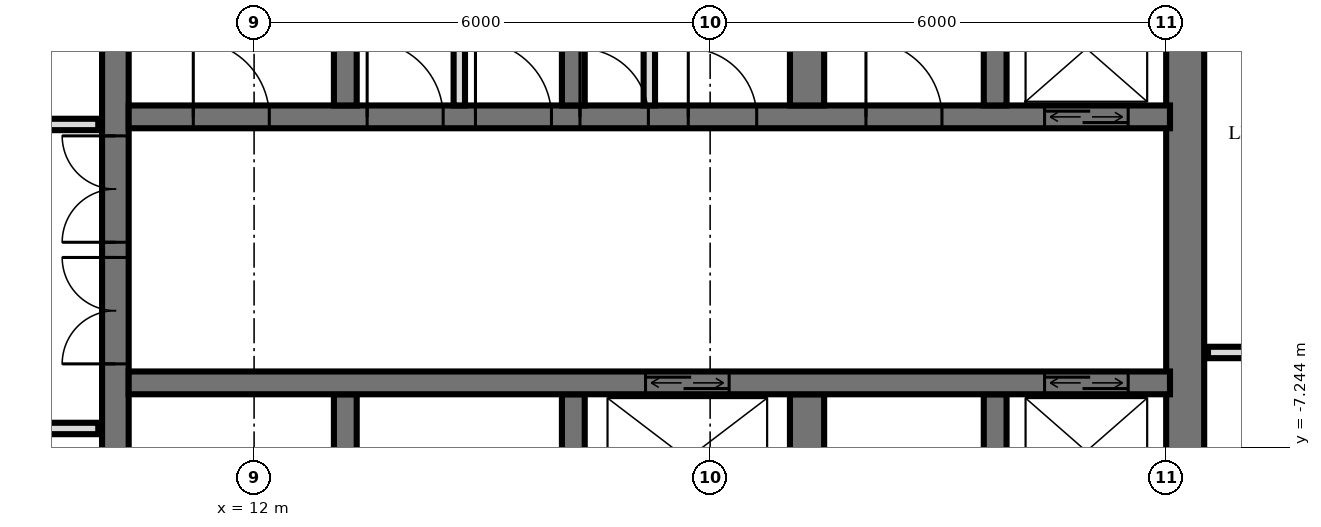
"""IFC4 building model, lengths in metres.
Left out: names, types, materials, properties, quantities, classifications, styles, units other than length and angle.
Written with IfcOpenShell. Run it as: python <this file> out.ifc"""

import sys

from ifc_helpers import new_model, si_unit, direction, frame, frame_2d, origin, place, context, subcontext, project, spatial, rectangle, extrude, element, fill, save


model = new_model("IFC4")
c1 = context("Model", 3, precision=1e-05, world=origin(), true_north=direction((0.0, 1.0)))
c2 = subcontext(c1, "Body", "Model", "MODEL_VIEW")
j1 = project(units=[si_unit("LENGTHUNIT", "METRE"), si_unit("PLANEANGLEUNIT", "RADIAN")], contexts=[c1])
p1 = place(None, origin())
s1 = spatial("IfcSite", under=j1, at=p1, CompositionType="ELEMENT")
p2 = place(p1, origin())
s2 = spatial("IfcBuilding", under=s1, at=p2, CompositionType="ELEMENT")
p3 = place(p2, frame((0.0, 0.0, 208.1)))
s3 = spatial("IfcBuildingStorey", under=s2, at=p3, CompositionType="ELEMENT", Elevation=208.1)
p4 = place(p3, frame((10.175, -14.55, 0.0), z_axis=(0.0, 0.0, 1.0), x_axis=(0.0, 1.0, 0.0)))
e1 = element("IfcWall", 1, at=p4, inside=s3, PredefinedType="SHEAR", context=c2, shape_type="SweptSolid", body=[
    extrude(rectangle(XDim=14.1, YDim=0.35, at=frame_2d((7.05, 0.0))), origin(), (0.0, 0.0, 1.0), 3.5),
])
p5 = place(p4, frame((8.4, 0.0, 0.0)))
e2 = element("IfcOpeningElement", 2, at=p5, cuts=e1, PredefinedType="OPENING", context=c2, shape_type="SweptSolid", body=[
    extrude(rectangle(XDim=1.4, YDim=2.4, at=frame_2d((0.7, 1.2))), frame((0.0, 0.185, 0.0), z_axis=(0.0, -1.0, 0.0), x_axis=(1.0, 0.0, 0.0)), (0.0, 0.0, 1.0), 0.37),
])
p6 = place(p4, frame((10.0, 0.0, 0.0)))
e3 = element("IfcOpeningElement", 3, at=p6, cuts=e1, PredefinedType="OPENING", context=c2, shape_type="SweptSolid", body=[
    extrude(rectangle(XDim=1.4, YDim=2.4, at=frame_2d((0.7, 1.2))), frame((0.0, 0.185, 0.0), z_axis=(0.0, -1.0, 0.0), x_axis=(1.0, 0.0, 0.0)), (0.0, 0.0, 1.0), 0.37),
])
p7 = place(p4, frame((4.0, 0.0, 0.0)))
e4 = element("IfcOpeningElement", 4, at=p7, cuts=e1, PredefinedType="OPENING", context=c2, shape_type="SweptSolid", body=[
    extrude(rectangle(XDim=1.2, YDim=2.1, at=frame_2d((0.6, 1.05))), frame((0.0, 0.185, 0.0), z_axis=(0.0, -1.0, 0.0), x_axis=(1.0, 0.0, 0.0)), (0.0, 0.0, 1.0), 0.37),
])
p8 = place(p3, frame((24.25, -14.55, 0.0), z_axis=(0.0, 0.0, 1.0), x_axis=(0.0, 1.0, 0.0)))
e5 = element("IfcWall", 5, at=p8, inside=s3, PredefinedType="SHEAR", context=c2, shape_type="SweptSolid", body=[
    extrude(rectangle(XDim=14.1, YDim=0.5, at=frame_2d((7.05, 0.0))), origin(), (0.0, 0.0, 1.0), 3.5),
])
p9 = place(p3, frame((10.35, -2.9, 0.0), z_axis=(0.0, 0.0, 1.0), x_axis=(1.0, 0.0, 0.0)))
e6 = element("IfcWall", 6, at=p9, inside=s3, PredefinedType="SHEAR", context=c2, shape_type="SweptSolid", body=[
    extrude(rectangle(XDim=13.7, YDim=0.3, at=frame_2d((6.85, 0.0))), origin(), (0.0, 0.0, 1.0), 3.5),
])
p10 = place(p9, frame((12.05, 0.0, 0.0)))
e7 = element("IfcOpeningElement", 7, at=p10, cuts=e6, PredefinedType="OPENING", context=c2, shape_type="SweptSolid", body=[
    extrude(rectangle(XDim=1.1, YDim=2.1, at=frame_2d((0.55, 1.05))), frame((0.0, 0.16, 0.0), z_axis=(0.0, -1.0, 0.0), x_axis=(1.0, 0.0, 0.0)), (0.0, 0.0, 1.0), 0.32),
])
p11 = place(p9, frame((5.938, 0.0, 0.0)))
e8 = element("IfcOpeningElement", 8, at=p11, cuts=e6, PredefinedType="OPENING", context=c2, shape_type="SweptSolid", body=[
    extrude(rectangle(XDim=0.9, YDim=2.1, at=frame_2d((0.45, 1.05))), frame((0.0, 0.16, 0.0), z_axis=(0.0, -1.0, 0.0), x_axis=(1.0, 0.0, 0.0)), (0.0, 0.0, 1.0), 0.32),
])
p12 = place(p9, frame((7.363, 0.0, 0.0)))
e9 = element("IfcOpeningElement", 9, at=p12, cuts=e6, PredefinedType="OPENING", context=c2, shape_type="SweptSolid", body=[
    extrude(rectangle(XDim=0.9, YDim=2.1, at=frame_2d((0.45, 1.05))), frame((0.0, 0.16, 0.0), z_axis=(0.0, -1.0, 0.0), x_axis=(1.0, 0.0, 0.0)), (0.0, 0.0, 1.0), 0.32),
])
p13 = place(p9, frame((0.85, 0.0, 0.0)))
e10 = element("IfcOpeningElement", 10, at=p13, cuts=e6, PredefinedType="OPENING", context=c2, shape_type="SweptSolid", body=[
    extrude(rectangle(XDim=1.0, YDim=2.1, at=frame_2d((0.5, 1.05))), frame((0.0, 0.16, 0.0), z_axis=(0.0, -1.0, 0.0), x_axis=(1.0, 0.0, 0.0)), (0.0, 0.0, 1.0), 0.32),
])
p14 = place(p9, frame((3.137, 0.0, 0.0)))
e11 = element("IfcOpeningElement", 11, at=p14, cuts=e6, PredefinedType="OPENING", context=c2, shape_type="SweptSolid", body=[
    extrude(rectangle(XDim=1.0, YDim=2.1, at=frame_2d((0.5, 1.05))), frame((0.0, 0.16, 0.0), z_axis=(0.0, -1.0, 0.0), x_axis=(1.0, 0.0, 0.0)), (0.0, 0.0, 1.0), 0.32),
])
p15 = place(p9, frame((4.562, 0.0, 0.0)))
e12 = element("IfcOpeningElement", 12, at=p15, cuts=e6, PredefinedType="OPENING", context=c2, shape_type="SweptSolid", body=[
    extrude(rectangle(XDim=1.0, YDim=2.1, at=frame_2d((0.5, 1.05))), frame((0.0, 0.16, 0.0), z_axis=(0.0, -1.0, 0.0), x_axis=(1.0, 0.0, 0.0)), (0.0, 0.0, 1.0), 0.32),
])
p16 = place(p9, frame((9.7, 0.0, 0.0)))
e13 = element("IfcOpeningElement", 13, at=p16, cuts=e6, PredefinedType="OPENING", context=c2, shape_type="SweptSolid", body=[
    extrude(rectangle(XDim=1.0, YDim=2.1, at=frame_2d((0.5, 1.05))), frame((0.0, 0.16, 0.0), z_axis=(0.0, -1.0, 0.0), x_axis=(1.0, 0.0, 0.0)), (0.0, 0.0, 1.0), 0.32),
])
p17 = place(p3, frame((10.35, -6.4, 0.0), z_axis=(0.0, 0.0, 1.0), x_axis=(1.0, 0.0, 0.0)))
e14 = element("IfcWall", 14, at=p17, inside=s3, PredefinedType="SHEAR", context=c2, shape_type="SweptSolid", body=[
    extrude(rectangle(XDim=13.7, YDim=0.3, at=frame_2d((6.85, 0.0))), origin(), (0.0, 0.0, 1.0), 3.5),
])
p18 = place(p17, frame((12.05, 0.0, 0.0)))
e15 = element("IfcOpeningElement", 15, at=p18, cuts=e14, PredefinedType="OPENING", context=c2, shape_type="SweptSolid", body=[
    extrude(rectangle(XDim=1.1, YDim=2.1, at=frame_2d((0.55, 1.05))), frame((0.0, 0.16, 0.0), z_axis=(0.0, -1.0, 0.0), x_axis=(1.0, 0.0, 0.0)), (0.0, 0.0, 1.0), 0.32),
])
p19 = place(p17, frame((6.8, 0.0, 0.0)))
e16 = element("IfcOpeningElement", 16, at=p19, cuts=e14, PredefinedType="OPENING", context=c2, shape_type="SweptSolid", body=[
    extrude(rectangle(XDim=1.1, YDim=2.1, at=frame_2d((0.55, 1.05))), frame((0.0, 0.16, 0.0), z_axis=(0.0, -1.0, 0.0), x_axis=(1.0, 0.0, 0.0)), (0.0, 0.0, 1.0), 0.32),
])
for number, where, z_axis, x_axis in (
    (17, (13.2, -2.75, 0.0), (0.0, 0.0, 1.0), (0.0, 1.0, 0.0)),
    (18, (13.2, -8.85, 0.0), (0.0, 0.0, 1.0), (0.0, 1.0, 0.0)),
    (19, (16.2, -2.75, 0.0), (0.0, 0.0, 1.0), (0.0, 1.0, 0.0)),
    (20, (16.2, -8.85, 0.0), (0.0, 0.0, 1.0), (0.0, 1.0, 0.0)),
):
    element("IfcWall", number, at=place(p3, frame(where, z_axis=z_axis, x_axis=x_axis)), inside=s3, PredefinedType="SHEAR", context=c2, shape_type="SweptSolid", body=[
        extrude(rectangle(XDim=2.3, YDim=0.3, at=frame_2d((1.15, 0.0))), origin(), (0.0, 0.0, 1.0), 3.5),
    ])
for number, where, z_axis, x_axis in (
    (21, (19.275, -2.75, 0.0), (0.0, 0.0, 1.0), (0.0, 1.0, 0.0)),
    (22, (19.275, -8.85, 0.0), (0.0, 0.0, 1.0), (0.0, 1.0, 0.0)),
):
    element("IfcWall", number, at=place(p3, frame(where, z_axis=z_axis, x_axis=x_axis)), inside=s3, PredefinedType="SHEAR", context=c2, shape_type="SweptSolid", body=[
        extrude(rectangle(XDim=2.3, YDim=0.45, at=frame_2d((1.15, 0.0))), origin(), (0.0, 0.0, 1.0), 3.5),
    ])
for number, where, z_axis, x_axis in (
    (23, (21.75, -2.75, 0.0), (0.0, 0.0, 1.0), (0.0, 1.0, 0.0)),
    (24, (21.75, -8.85, 0.0), (0.0, 0.0, 1.0), (0.0, 1.0, 0.0)),
):
    element("IfcWall", number, at=place(p3, frame(where, z_axis=z_axis, x_axis=x_axis)), inside=s3, PredefinedType="SHEAR", context=c2, shape_type="SweptSolid", body=[
        extrude(rectangle(XDim=2.3, YDim=0.3, at=frame_2d((1.15, 0.0))), origin(), (0.0, 0.0, 1.0), 3.5),
    ])
for number, where, z_axis, x_axis in (
    (25, (17.2, -2.75, 0.0), (0.0, 0.0, 1.0), (0.0, 1.0, 0.0)),
    (26, (14.7, -2.75, 0.0), (0.0, 0.0, 1.0), (0.0, 1.0, 0.0)),
):
    element("IfcWall", number, at=place(p3, frame(where, z_axis=z_axis, x_axis=x_axis)), inside=s3, PredefinedType="PARTITIONING", context=c2, shape_type="SweptSolid", body=[
        extrude(rectangle(XDim=2.3, YDim=0.15, at=frame_2d((1.15, 0.0))), origin(), (0.0, 0.0, 1.0), 3.2),
    ])
p20 = place(p3, frame((-9.95, -7.0, 0.0), z_axis=(0.0, 0.0, 1.0), x_axis=(1.0, 0.0, 0.0)))
e27 = element("IfcWall", 27, at=p20, inside=s3, PredefinedType="PARTITIONING", context=c2, shape_type="SweptSolid", body=[
    extrude(rectangle(XDim=19.9, YDim=0.15, at=frame_2d((9.95, 0.0))), origin(), (0.0, 0.0, 1.0), 3.22),
])
p21 = place(p20, frame((9.45, 0.0, 0.0)))
e28 = element("IfcOpeningElement", 28, at=p21, cuts=e27, PredefinedType="OPENING", context=c2, shape_type="SweptSolid", body=[
    extrude(rectangle(XDim=1.0, YDim=2.1, at=frame_2d((0.5, 1.05))), frame((0.0, 0.085, 0.0), z_axis=(0.0, -1.0, 0.0), x_axis=(1.0, 0.0, 0.0)), (0.0, 0.0, 1.0), 0.17),
])
p22 = place(p20, frame((3.45, 0.0, 0.0)))
e29 = element("IfcOpeningElement", 29, at=p22, cuts=e27, PredefinedType="OPENING", context=c2, shape_type="SweptSolid", body=[
    extrude(rectangle(XDim=1.0, YDim=2.1, at=frame_2d((0.5, 1.05))), frame((0.0, 0.085, 0.0), z_axis=(0.0, -1.0, 0.0), x_axis=(1.0, 0.0, 0.0)), (0.0, 0.0, 1.0), 0.17),
])
p23 = place(p3, frame((24.55, -6.0, 0.0), z_axis=(0.0, 0.0, 1.0), x_axis=(1.0, 0.0, 0.0)))
e30 = element("IfcWall", 30, at=p23, inside=s3, PredefinedType="PARTITIONING", context=c2, shape_type="SweptSolid", body=[
    extrude(rectangle(XDim=2.27, YDim=0.15, at=frame_2d((1.135, 0.0))), origin(), (0.0, 0.0, 1.0), 3.22),
])
p24 = place(p23, frame((0.75, 0.0, 0.0)))
e31 = element("IfcOpeningElement", 31, at=p24, cuts=e30, PredefinedType="OPENING", context=c2, shape_type="SweptSolid", body=[
    extrude(rectangle(XDim=0.9, YDim=2.1, at=frame_2d((0.45, 1.05))), frame((0.0, 0.085, 0.0), z_axis=(0.0, -1.0, 0.0), x_axis=(1.0, 0.0, 0.0)), (0.0, 0.0, 1.0), 0.17),
])
p25 = place(p3, frame((-9.95, -3.0, 0.0), z_axis=(0.0, 0.0, 1.0), x_axis=(1.0, 0.0, 0.0)))
e32 = element("IfcWall", 32, at=p25, inside=s3, PredefinedType="PARTITIONING", context=c2, shape_type="SweptSolid", body=[
    extrude(rectangle(XDim=19.9, YDim=0.15, at=frame_2d((9.95, 0.0))), origin(), (0.0, 0.0, 1.0), 3.22),
])
p26 = place(p25, frame((4.2, 0.0, 0.0)))
e33 = element("IfcOpeningElement", 33, at=p26, cuts=e32, PredefinedType="OPENING", context=c2, shape_type="SweptSolid", body=[
    extrude(rectangle(XDim=1.0, YDim=2.1, at=frame_2d((0.5, 1.05))), frame((0.0, 0.085, 0.0), z_axis=(0.0, -1.0, 0.0), x_axis=(1.0, 0.0, 0.0)), (0.0, 0.0, 1.0), 0.17),
])
p27 = place(p25, frame((11.45, 0.0, 0.0)))
e34 = element("IfcOpeningElement", 34, at=p27, cuts=e32, PredefinedType="OPENING", context=c2, shape_type="SweptSolid", body=[
    extrude(rectangle(XDim=1.0, YDim=2.1, at=frame_2d((0.5, 1.05))), frame((0.0, 0.085, 0.0), z_axis=(0.0, -1.0, 0.0), x_axis=(1.0, 0.0, 0.0)), (0.0, 0.0, 1.0), 0.17),
])
p28 = place(p25, frame((15.45, 0.0, 0.0)))
e35 = element("IfcOpeningElement", 35, at=p28, cuts=e32, PredefinedType="OPENING", context=c2, shape_type="SweptSolid", body=[
    extrude(rectangle(XDim=1.0, YDim=2.1, at=frame_2d((0.5, 1.05))), frame((0.0, 0.085, 0.0), z_axis=(0.0, -1.0, 0.0), x_axis=(1.0, 0.0, 0.0)), (0.0, 0.0, 1.0), 0.17),
])
p29 = place(p25, frame((18.2, 0.0, 0.0)))
e36 = element("IfcOpeningElement", 36, at=p29, cuts=e32, PredefinedType="OPENING", context=c2, shape_type="SweptSolid", body=[
    extrude(rectangle(XDim=1.0, YDim=2.1, at=frame_2d((0.5, 1.05))), frame((0.0, 0.085, 0.0), z_axis=(0.0, -1.0, 0.0), x_axis=(1.0, 0.0, 0.0)), (0.0, 0.0, 1.0), 0.17),
])
p30 = place(p10, origin())
e37 = element("IfcDoor", 37, at=p30, inside=s3, OperationType="DOUBLE_DOOR_SLIDING", PredefinedType="USERDEFINED", context=c2, shape_type="SweptSolid", body=[
    extrude(rectangle(XDim=1.1, YDim=2.1, at=frame_2d((0.55, 1.05))), frame((0.0, 0.025, 0.0), z_axis=(0.0, -1.0, 0.0), x_axis=(1.0, 0.0, 0.0)), (0.0, 0.0, 1.0), 0.05),
])
fill(e7, e37)
p31 = place(p18, origin())
e38 = element("IfcDoor", 38, at=p31, inside=s3, OperationType="DOUBLE_DOOR_SLIDING", PredefinedType="USERDEFINED", context=c2, shape_type="SweptSolid", body=[
    extrude(rectangle(XDim=1.1, YDim=2.1, at=frame_2d((0.55, 1.05))), frame((0.0, 0.025, 0.0), z_axis=(0.0, -1.0, 0.0), x_axis=(1.0, 0.0, 0.0)), (0.0, 0.0, 1.0), 0.05),
])
fill(e15, e38)
p32 = place(p19, origin())
e39 = element("IfcDoor", 39, at=p32, inside=s3, OperationType="DOUBLE_DOOR_SLIDING", PredefinedType="USERDEFINED", context=c2, shape_type="SweptSolid", body=[
    extrude(rectangle(XDim=1.1, YDim=2.1, at=frame_2d((0.55, 1.05))), frame((0.0, 0.025, 0.0), z_axis=(0.0, -1.0, 0.0), x_axis=(1.0, 0.0, 0.0)), (0.0, 0.0, 1.0), 0.05),
])
fill(e16, e39)
p33 = place(p5, origin())
e40 = element("IfcDoor", 40, at=p33, inside=s3, OperationType="DOUBLE_DOOR_SINGLE_SWING", PredefinedType="DOOR", context=c2, shape_type="SweptSolid", body=[
    extrude(rectangle(XDim=1.4, YDim=2.4, at=frame_2d((0.7, 1.2))), frame((0.0, 0.025, 0.0), z_axis=(0.0, -1.0, 0.0), x_axis=(1.0, 0.0, 0.0)), (0.0, 0.0, 1.0), 0.05),
])
fill(e2, e40)
p34 = place(p6, origin())
e41 = element("IfcDoor", 41, at=p34, inside=s3, OperationType="DOUBLE_DOOR_SINGLE_SWING", PredefinedType="DOOR", context=c2, shape_type="SweptSolid", body=[
    extrude(rectangle(XDim=1.4, YDim=2.4, at=frame_2d((0.7, 1.2))), frame((0.0, 0.025, 0.0), z_axis=(0.0, -1.0, 0.0), x_axis=(1.0, 0.0, 0.0)), (0.0, 0.0, 1.0), 0.05),
])
fill(e3, e41)
p35 = place(p11, origin())
e42 = element("IfcDoor", 42, at=p35, inside=s3, OperationType="SINGLE_SWING_RIGHT", PredefinedType="DOOR", context=c2, shape_type="SweptSolid", body=[
    extrude(rectangle(XDim=0.9, YDim=2.1, at=frame_2d((0.45, 1.05))), frame((0.0, 0.025, 0.0), z_axis=(0.0, -1.0, 0.0), x_axis=(1.0, 0.0, 0.0)), (0.0, 0.0, 1.0), 0.05),
])
fill(e8, e42)
p36 = place(p12, origin())
e43 = element("IfcDoor", 43, at=p36, inside=s3, OperationType="SINGLE_SWING_RIGHT", PredefinedType="DOOR", context=c2, shape_type="SweptSolid", body=[
    extrude(rectangle(XDim=0.9, YDim=2.1, at=frame_2d((0.45, 1.05))), frame((0.0, 0.025, 0.0), z_axis=(0.0, -1.0, 0.0), x_axis=(1.0, 0.0, 0.0)), (0.0, 0.0, 1.0), 0.05),
])
fill(e9, e43)
p37 = place(p13, origin())
e44 = element("IfcDoor", 44, at=p37, inside=s3, OperationType="SINGLE_SWING_RIGHT", PredefinedType="DOOR", context=c2, shape_type="SweptSolid", body=[
    extrude(rectangle(XDim=1.0, YDim=2.1, at=frame_2d((0.5, 1.05))), frame((0.0, 0.025, 0.0), z_axis=(0.0, -1.0, 0.0), x_axis=(1.0, 0.0, 0.0)), (0.0, 0.0, 1.0), 0.05),
])
fill(e10, e44)
p38 = place(p14, origin())
e45 = element("IfcDoor", 45, at=p38, inside=s3, OperationType="SINGLE_SWING_RIGHT", PredefinedType="DOOR", context=c2, shape_type="SweptSolid", body=[
    extrude(rectangle(XDim=1.0, YDim=2.1, at=frame_2d((0.5, 1.05))), frame((0.0, 0.025, 0.0), z_axis=(0.0, -1.0, 0.0), x_axis=(1.0, 0.0, 0.0)), (0.0, 0.0, 1.0), 0.05),
])
fill(e11, e45)
p39 = place(p15, origin())
e46 = element("IfcDoor", 46, at=p39, inside=s3, OperationType="SINGLE_SWING_RIGHT", PredefinedType="DOOR", context=c2, shape_type="SweptSolid", body=[
    extrude(rectangle(XDim=1.0, YDim=2.1, at=frame_2d((0.5, 1.05))), frame((0.0, 0.025, 0.0), z_axis=(0.0, -1.0, 0.0), x_axis=(1.0, 0.0, 0.0)), (0.0, 0.0, 1.0), 0.05),
])
fill(e12, e46)
p40 = place(p16, origin())
e47 = element("IfcDoor", 47, at=p40, inside=s3, OperationType="SINGLE_SWING_RIGHT", PredefinedType="DOOR", context=c2, shape_type="SweptSolid", body=[
    extrude(rectangle(XDim=1.0, YDim=2.1, at=frame_2d((0.5, 1.05))), frame((0.0, 0.025, 0.0), z_axis=(0.0, -1.0, 0.0), x_axis=(1.0, 0.0, 0.0)), (0.0, 0.0, 1.0), 0.05),
])
fill(e13, e47)
save(model, sys.argv[1])
